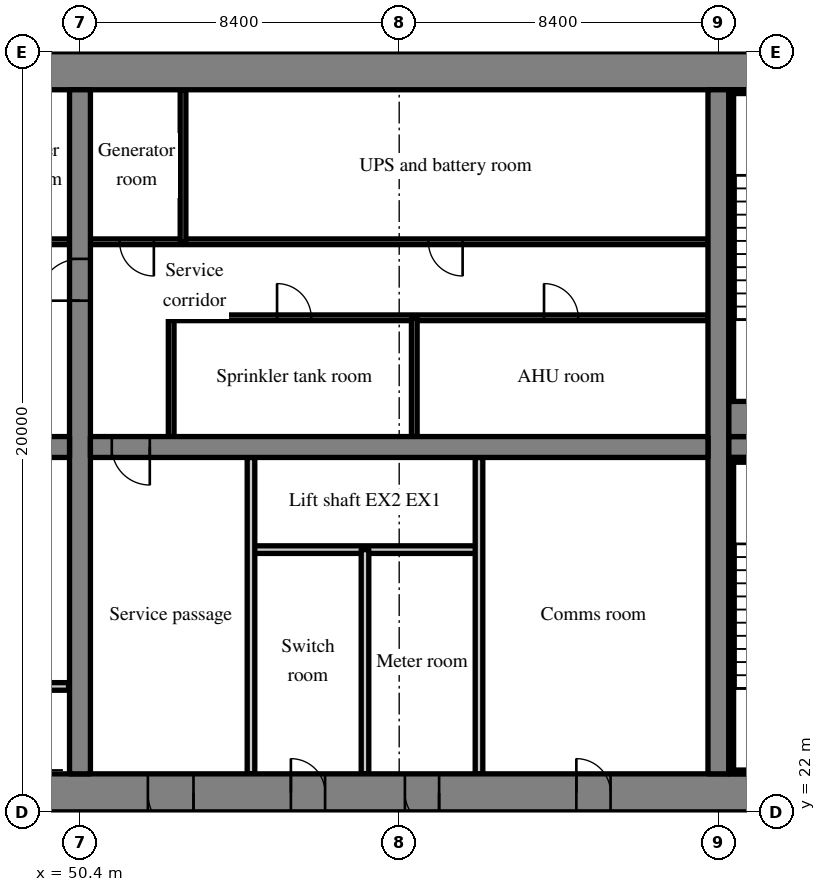
"""IFC4 building model, lengths in metres.
Left out: names, types, materials, properties, quantities, classifications, styles, units other than length and angle.
Written with IfcOpenShell. Run it as: python <this file> out.ifc"""

import sys

from ifc_helpers import new_model, si_unit, direction, frame, frame_2d, origin, place, context, subcontext, project, spatial, rectangle, extrude, source, transform, mapped, element, fill, save


model = new_model("IFC4")
c1 = context("Model", 3, precision=1e-05, world=origin(), true_north=direction((0.0, 1.0)))
c2 = subcontext(c1, "Body", "Model", "MODEL_VIEW")
j1 = project(units=[si_unit("LENGTHUNIT", "METRE"), si_unit("PLANEANGLEUNIT", "RADIAN")], contexts=[c1])
p1 = place(None, origin())
s1 = spatial("IfcSite", under=j1, at=p1, CompositionType="ELEMENT")
p2 = place(p1, origin())
s2 = spatial("IfcBuilding", under=s1, at=p2, CompositionType="ELEMENT")
p3 = place(p2, frame((0.0, 0.0, 81.0)))
s3 = spatial("IfcBuildingStorey", under=s2, at=p3, CompositionType="ELEMENT", Elevation=81.0)
m1 = source(origin(), c2, "Body", "SweptSolid", [
    extrude(rectangle(XDim=50.4, YDim=1.0, at=frame_2d((25.2, 0.0))), origin(), (0.0, 0.0, 1.0), 5.12),
])
p4 = place(p3, frame((25.2, 22.5, 0.0), z_axis=(0.0, 0.0, 1.0), x_axis=(1.0, 0.0, 0.0)))
e1 = element("IfcWall", 1, at=p4, inside=s3, PredefinedType="SHEAR", context=c2, shape_type="MappedRepresentation", body=[
    mapped(m1, transform((0.0, 0.0, 0.0), scale=1.0)),
])
m2 = source(origin(), c2, "Body", "SweptSolid", [
    extrude(rectangle(XDim=1.8, YDim=2.1, at=frame_2d((0.9, 1.05))), frame((0.0, 0.51, 0.0), z_axis=(0.0, -1.0, 0.0), x_axis=(1.0, 0.0, 0.0)), (0.0, 0.0, 1.0), 1.02),
])
p5 = place(p4, frame((15.9, 0.0, 0.0)))
e2 = element("IfcOpeningElement", 2, at=p5, cuts=e1, PredefinedType="OPENING", context=c2, shape_type="MappedRepresentation", body=[
    mapped(m2, transform((0.0, 0.0, 0.0), scale=1.0)),
])
m3 = source(origin(), c2, "Body", "SweptSolid", [
    extrude(rectangle(XDim=1.2, YDim=2.1, at=frame_2d((0.6, 1.05))), frame((0.0, 0.51, 0.0), z_axis=(0.0, -1.0, 0.0), x_axis=(1.0, 0.0, 0.0)), (0.0, 0.0, 1.0), 1.02),
])
p6 = place(p4, frame((26.987, 0.0, 0.0)))
e3 = element("IfcOpeningElement", 3, at=p6, cuts=e1, PredefinedType="OPENING", context=c2, shape_type="MappedRepresentation", body=[
    mapped(m3, transform((0.0, 0.0, 0.0), scale=1.0)),
])
m4 = source(origin(), c2, "Body", "SweptSolid", [
    extrude(rectangle(XDim=0.9, YDim=2.1, at=frame_2d((0.45, 1.05))), frame((0.0, 0.51, 0.0), z_axis=(0.0, -1.0, 0.0), x_axis=(1.0, 0.0, 0.0)), (0.0, 0.0, 1.0), 1.02),
])
p7 = place(p4, frame((33.75, 0.0, 0.0)))
e4 = element("IfcOpeningElement", 4, at=p7, cuts=e1, PredefinedType="OPENING", context=c2, shape_type="MappedRepresentation", body=[
    mapped(m4, transform((0.0, 0.0, 0.0), scale=1.0)),
])
p8 = place(p4, frame((30.75, 0.0, 0.0)))
e5 = element("IfcOpeningElement", 5, at=p8, cuts=e1, PredefinedType="OPENING", context=c2, shape_type="MappedRepresentation", body=[
    mapped(m4, transform((0.0, 0.0, 0.0), scale=1.0)),
])
p9 = place(p4, frame((38.262, 0.0, 0.0)))
e6 = element("IfcOpeningElement", 6, at=p9, cuts=e1, PredefinedType="OPENING", context=c2, shape_type="MappedRepresentation", body=[
    mapped(m4, transform((0.0, 0.0, 0.0), scale=1.0)),
])
p10 = place(p4, frame((6.438, 0.0, 0.0)))
e7 = element("IfcOpeningElement", 7, at=p10, cuts=e1, PredefinedType="OPENING", context=c2, shape_type="MappedRepresentation", body=[
    mapped(m3, transform((0.0, 0.0, 0.0), scale=1.0)),
])
p11 = place(p4, frame((47.725, 0.0, 0.0)))
e8 = element("IfcOpeningElement", 8, at=p11, cuts=e1, PredefinedType="OPENING", context=c2, shape_type="MappedRepresentation", body=[
    mapped(m3, transform((0.0, 0.0, 0.0), scale=1.0)),
])
p12 = place(p3, frame((25.2, 41.5, 0.0), z_axis=(0.0, 0.0, 1.0), x_axis=(1.0, 0.0, 0.0)))
e9 = element("IfcWall", 9, at=p12, inside=s3, PredefinedType="SHEAR", context=c2, shape_type="MappedRepresentation", body=[
    mapped(m1, transform((0.0, 0.0, 0.0), scale=1.0)),
])
m5 = source(origin(), c2, "Body", "SweptSolid", [
    extrude(rectangle(XDim=18.0, YDim=0.55, at=frame_2d((9.0, 0.0))), origin(), (0.0, 0.0, 1.0), 5.12),
])
p13 = place(p3, frame((50.4, 23.0, 0.0), z_axis=(0.0, 0.0, 1.0), x_axis=(0.0, 1.0, 0.0)))
e10 = element("IfcWall", 10, at=p13, inside=s3, PredefinedType="SHEAR", context=c2, shape_type="MappedRepresentation", body=[
    mapped(m5, transform((0.0, 0.0, 0.0), scale=1.0)),
])
m6 = source(origin(), c2, "Body", "SweptSolid", [
    extrude(rectangle(XDim=1.1, YDim=2.1, at=frame_2d((0.55, 1.05))), frame((0.0, 0.285, 0.0), z_axis=(0.0, -1.0, 0.0), x_axis=(1.0, 0.0, 0.0)), (0.0, 0.0, 1.0), 0.57),
])
p14 = place(p13, frame((12.45, 0.0, 0.0)))
e11 = element("IfcOpeningElement", 11, at=p14, cuts=e10, PredefinedType="OPENING", context=c2, shape_type="MappedRepresentation", body=[
    mapped(m6, transform((0.0, 0.0, 0.0), scale=1.0)),
])
p15 = place(p3, frame((67.2, 23.0, 0.0), z_axis=(0.0, 0.0, 1.0), x_axis=(0.0, 1.0, 0.0)))
e12 = element("IfcWall", 12, at=p15, inside=s3, PredefinedType="SHEAR", context=c2, shape_type="MappedRepresentation", body=[
    mapped(m5, transform((0.0, 0.0, 0.0), scale=1.0)),
])
m7 = source(origin(), c2, "Body", "SweptSolid", [
    extrude(rectangle(XDim=16.25, YDim=0.55, at=frame_2d((8.125, 0.0))), origin(), (0.0, 0.0, 1.0), 5.12),
])
p16 = place(p3, frame((33.875, 31.6, 0.0), z_axis=(0.0, 0.0, 1.0), x_axis=(1.0, 0.0, 0.0)))
e13 = element("IfcWall", 13, at=p16, inside=s3, PredefinedType="SHEAR", context=c2, shape_type="MappedRepresentation", body=[
    mapped(m7, transform((0.0, 0.0, 0.0), scale=1.0)),
])
m8 = source(origin(), c2, "Body", "SweptSolid", [
    extrude(rectangle(XDim=1.0, YDim=2.1, at=frame_2d((0.5, 1.05))), frame((0.0, 0.285, 0.0), z_axis=(0.0, -1.0, 0.0), x_axis=(1.0, 0.0, 0.0)), (0.0, 0.0, 1.0), 0.57),
])
p17 = place(p16, frame((14.687, 0.0, 0.0)))
e14 = element("IfcOpeningElement", 14, at=p17, cuts=e13, PredefinedType="OPENING", context=c2, shape_type="MappedRepresentation", body=[
    mapped(m8, transform((0.0, 0.0, 0.0), scale=1.0)),
])
p18 = place(p3, frame((50.675, 31.6, 0.0), z_axis=(0.0, 0.0, 1.0), x_axis=(1.0, 0.0, 0.0)))
e15 = element("IfcWall", 15, at=p18, inside=s3, PredefinedType="SHEAR", context=c2, shape_type="MappedRepresentation", body=[
    mapped(m7, transform((0.0, 0.0, 0.0), scale=1.0)),
])
p19 = place(p18, frame((0.562, 0.0, 0.0)))
e16 = element("IfcOpeningElement", 16, at=p19, cuts=e15, PredefinedType="OPENING", context=c2, shape_type="MappedRepresentation", body=[
    mapped(m8, transform((0.0, 0.0, 0.0), scale=1.0)),
])
m9 = source(origin(), c2, "Body", "SweptSolid", [
    extrude(rectangle(XDim=7.125, YDim=0.55, at=frame_2d((3.562, 0.0))), origin(), (0.0, 0.0, 1.0), 5.12),
])
p20 = place(p3, frame((67.475, 31.6, 0.0), z_axis=(0.0, 0.0, 1.0), x_axis=(1.0, 0.0, 0.0)))
e17 = element("IfcWall", 17, at=p20, inside=s3, PredefinedType="SHEAR", context=c2, shape_type="MappedRepresentation", body=[
    mapped(m9, transform((0.0, 0.0, 0.0), scale=1.0)),
])
p21 = place(p20, frame((5.5, 0.0, 0.0)))
e18 = element("IfcOpeningElement", 18, at=p21, cuts=e17, PredefinedType="OPENING", context=c2, shape_type="MappedRepresentation", body=[
    mapped(m6, transform((0.0, 0.0, 0.0), scale=1.0)),
])
m10 = source(origin(), c2, "Body", "SweptSolid", [
    extrude(rectangle(XDim=6.0, YDim=0.2, at=frame_2d((3.0, 0.0))), origin(), (0.0, 0.0, 1.0), 5.12),
])
p22 = place(p3, frame((44.1, 25.3, 0.0), z_axis=(0.0, 0.0, 1.0), x_axis=(1.0, 0.0, 0.0)))
e19 = element("IfcWall", 19, at=p22, inside=s3, PredefinedType="SOLIDWALL", context=c2, shape_type="MappedRepresentation", body=[
    mapped(m10, transform((0.0, 0.0, 0.0), scale=1.0)),
])
m11 = source(origin(), c2, "Body", "SweptSolid", [
    extrude(rectangle(XDim=16.25, YDim=0.15, at=frame_2d((8.125, 0.0))), origin(), (0.0, 0.0, 1.0), 5.12),
])
p23 = place(p3, frame((33.875, 37.0, 0.0), z_axis=(0.0, 0.0, 1.0), x_axis=(1.0, 0.0, 0.0)))
e20 = element("IfcWall", 20, at=p23, inside=s3, PredefinedType="PARTITIONING", context=c2, shape_type="MappedRepresentation", body=[
    mapped(m11, transform((0.0, 0.0, 0.0), scale=1.0)),
])
m12 = source(origin(), c2, "Body", "SweptSolid", [
    extrude(rectangle(XDim=0.9, YDim=2.1, at=frame_2d((0.45, 1.05))), frame((0.0, 0.085, 0.0), z_axis=(0.0, -1.0, 0.0), x_axis=(1.0, 0.0, 0.0)), (0.0, 0.0, 1.0), 0.17),
])
p24 = place(p23, frame((0.769, 0.0, 0.0)))
e21 = element("IfcOpeningElement", 21, at=p24, cuts=e20, PredefinedType="OPENING", context=c2, shape_type="MappedRepresentation", body=[
    mapped(m12, transform((0.0, 0.0, 0.0), scale=1.0)),
])
p25 = place(p23, frame((3.613, 0.0, 0.0)))
e22 = element("IfcOpeningElement", 22, at=p25, cuts=e20, PredefinedType="OPENING", context=c2, shape_type="MappedRepresentation", body=[
    mapped(m12, transform((0.0, 0.0, 0.0), scale=1.0)),
])
p26 = place(p23, frame((9.3, 0.0, 0.0)))
e23 = element("IfcOpeningElement", 23, at=p26, cuts=e20, PredefinedType="OPENING", context=c2, shape_type="MappedRepresentation", body=[
    mapped(m12, transform((0.0, 0.0, 0.0), scale=1.0)),
])
p27 = place(p23, frame((14.581, 0.0, 0.0)))
e24 = element("IfcOpeningElement", 24, at=p27, cuts=e20, PredefinedType="OPENING", context=c2, shape_type="MappedRepresentation", body=[
    mapped(m12, transform((0.0, 0.0, 0.0), scale=1.0)),
])
p28 = place(p3, frame((60.9, 28.9, 0.0), z_axis=(0.0, 0.0, 1.0), x_axis=(-1.0, 0.0, 0.0)))
e25 = element("IfcWall", 25, at=p28, inside=s3, PredefinedType="SOLIDWALL", context=c2, shape_type="MappedRepresentation", body=[
    mapped(m10, transform((0.0, 0.0, 0.0), scale=1.0)),
])
m13 = source(origin(), c2, "Body", "SweptSolid", [
    extrude(rectangle(XDim=8.325, YDim=0.2, at=frame_2d((4.163, 0.0))), origin(), (0.0, 0.0, 1.0), 5.12),
])
for number, where, z_axis, x_axis in (
    (26, (54.9, 23.0, 0.0), (0.0, 0.0, 1.0), (0.0, 1.0, 0.0)),
    (27, (60.9, 23.0, 0.0), (0.0, 0.0, 1.0), (0.0, 1.0, 0.0)),
):
    element("IfcWall", number, at=place(p3, frame(where, z_axis=z_axis, x_axis=x_axis)), inside=s3, PredefinedType="PARTITIONING", context=c2, shape_type="MappedRepresentation", body=[
        mapped(m13, transform((0.0, 0.0, 0.0), scale=1.0)),
    ])
m14 = source(origin(), c2, "Body", "SweptSolid", [
    extrude(rectangle(XDim=5.9, YDim=0.2, at=frame_2d((2.95, 0.0))), origin(), (0.0, 0.0, 1.0), 5.12),
])
p29 = place(p3, frame((57.9, 23.0, 0.0), z_axis=(0.0, 0.0, 1.0), x_axis=(0.0, 1.0, 0.0)))
e28 = element("IfcWall", 28, at=p29, inside=s3, PredefinedType="PARTITIONING", context=c2, shape_type="MappedRepresentation", body=[
    mapped(m14, transform((0.0, 0.0, 0.0), scale=1.0)),
])
m15 = source(origin(), c2, "Body", "SweptSolid", [
    extrude(rectangle(XDim=3.125, YDim=0.15, at=frame_2d((1.562, 0.0))), origin(), (0.0, 0.0, 1.0), 5.12),
])
p30 = place(p3, frame((52.8, 31.875, 0.0), z_axis=(0.0, 0.0, 1.0), x_axis=(0.0, 1.0, 0.0)))
e29 = element("IfcWall", 29, at=p30, inside=s3, PredefinedType="PARTITIONING", context=c2, shape_type="MappedRepresentation", body=[
    mapped(m15, transform((0.0, 0.0, 0.0), scale=1.0)),
])
m16 = source(origin(), c2, "Body", "SweptSolid", [
    extrude(rectangle(XDim=14.125, YDim=0.15, at=frame_2d((7.062, 0.0))), origin(), (0.0, 0.0, 1.0), 5.12),
])
p31 = place(p3, frame((66.925, 35.0, 0.0), z_axis=(0.0, 0.0, 1.0), x_axis=(-1.0, 0.0, 0.0)))
e30 = element("IfcWall", 30, at=p31, inside=s3, PredefinedType="PARTITIONING", context=c2, shape_type="MappedRepresentation", body=[
    mapped(m16, transform((0.0, 0.0, 0.0), scale=1.0)),
])
p32 = place(p31, frame((3.414, 0.0, 0.0)))
e31 = element("IfcOpeningElement", 31, at=p32, cuts=e30, PredefinedType="OPENING", context=c2, shape_type="MappedRepresentation", body=[
    mapped(m12, transform((0.0, 0.0, 0.0), scale=1.0)),
])
p33 = place(p31, frame((10.439, 0.0, 0.0)))
e32 = element("IfcOpeningElement", 32, at=p33, cuts=e30, PredefinedType="OPENING", context=c2, shape_type="MappedRepresentation", body=[
    mapped(m12, transform((0.0, 0.0, 0.0), scale=1.0)),
])
p34 = place(p3, frame((66.925, 37.0, 0.0), z_axis=(0.0, 0.0, 1.0), x_axis=(-1.0, 0.0, 0.0)))
e33 = element("IfcWall", 33, at=p34, inside=s3, PredefinedType="PARTITIONING", context=c2, shape_type="MappedRepresentation", body=[
    mapped(m11, transform((0.0, 0.0, 0.0), scale=1.0)),
])
p35 = place(p34, frame((6.456, 0.0, 0.0)))
e34 = element("IfcOpeningElement", 34, at=p35, cuts=e33, PredefinedType="OPENING", context=c2, shape_type="MappedRepresentation", body=[
    mapped(m12, transform((0.0, 0.0, 0.0), scale=1.0)),
])
p36 = place(p34, frame((14.581, 0.0, 0.0)))
e35 = element("IfcOpeningElement", 35, at=p36, cuts=e33, PredefinedType="OPENING", context=c2, shape_type="MappedRepresentation", body=[
    mapped(m12, transform((0.0, 0.0, 0.0), scale=1.0)),
])
p37 = place(p3, frame((59.197, 31.875, 0.0), z_axis=(0.0, 0.0, 1.0), x_axis=(0.0, 1.0, 0.0)))
e36 = element("IfcWall", 36, at=p37, inside=s3, PredefinedType="PARTITIONING", context=c2, shape_type="MappedRepresentation", body=[
    mapped(m15, transform((0.0, 0.0, 0.0), scale=1.0)),
])
m17 = source(origin(), c2, "Body", "SweptSolid", [
    extrude(rectangle(XDim=4.0, YDim=0.15, at=frame_2d((2.0, 0.0))), origin(), (0.0, 0.0, 1.0), 5.12),
])
p38 = place(p3, frame((53.112, 37.0, 0.0), z_axis=(0.0, 0.0, 1.0), x_axis=(0.0, 1.0, 0.0)))
e37 = element("IfcWall", 37, at=p38, inside=s3, PredefinedType="PARTITIONING", context=c2, shape_type="MappedRepresentation", body=[
    mapped(m17, transform((0.0, 0.0, 0.0), scale=1.0)),
])
m18 = source(origin(), c2, "Body", "SweptSolid", [
    extrude(rectangle(XDim=4.775, YDim=0.1, at=frame_2d((2.387, 0.0))), origin(), (0.0, 0.0, 1.0), 5.12),
])
p39 = place(p3, frame((67.475, 23.05, 0.0), z_axis=(0.0, 0.0, 1.0), x_axis=(1.0, 0.0, 0.0)))
e38 = element("IfcWall", 38, at=p39, inside=s3, PredefinedType="SOLIDWALL", context=c2, shape_type="MappedRepresentation", body=[
    mapped(m18, transform((0.0, 0.0, 0.0), scale=1.0)),
])
m19 = source(origin(), c2, "Body", "SweptSolid", [
    extrude(rectangle(XDim=4.775, YDim=0.125, at=frame_2d((2.387, 0.0))), origin(), (0.0, 0.0, 1.0), 5.12),
])
p40 = place(p3, frame((67.475, 31.262, 0.0), z_axis=(0.0, 0.0, 1.0), x_axis=(1.0, 0.0, 0.0)))
e39 = element("IfcWall", 39, at=p40, inside=s3, PredefinedType="SOLIDWALL", context=c2, shape_type="MappedRepresentation", body=[
    mapped(m19, transform((0.0, 0.0, 0.0), scale=1.0)),
])
m20 = source(origin(), c2, "Body", "SweptSolid", [
    extrude(rectangle(XDim=8.1, YDim=0.125, at=frame_2d((4.05, 0.0))), origin(), (0.0, 0.0, 1.0), 5.12),
])
p41 = place(p3, frame((67.537, 23.1, 0.0), z_axis=(0.0, 0.0, 1.0), x_axis=(0.0, 1.0, 0.0)))
e40 = element("IfcWall", 40, at=p41, inside=s3, PredefinedType="SOLIDWALL", context=c2, shape_type="MappedRepresentation", body=[
    mapped(m20, transform((0.0, 0.0, 0.0), scale=1.0)),
])
p42 = place(p3, frame((67.475, 40.95, 0.0), z_axis=(0.0, 0.0, 1.0), x_axis=(1.0, 0.0, 0.0)))
e41 = element("IfcWall", 41, at=p42, inside=s3, PredefinedType="SOLIDWALL", context=c2, shape_type="MappedRepresentation", body=[
    mapped(m18, transform((0.0, 0.0, 0.0), scale=1.0)),
])
m21 = source(origin(), c2, "Body", "SweptSolid", [
    extrude(rectangle(XDim=4.775, YDim=0.925, at=frame_2d((2.387, 0.0))), origin(), (0.0, 0.0, 1.0), 5.12),
])
p43 = place(p3, frame((67.475, 32.337, 0.0), z_axis=(0.0, 0.0, 1.0), x_axis=(1.0, 0.0, 0.0)))
e42 = element("IfcWall", 42, at=p43, inside=s3, PredefinedType="SOLIDWALL", context=c2, shape_type="MappedRepresentation", body=[
    mapped(m21, transform((0.0, 0.0, 0.0), scale=1.0)),
])
p44 = place(p3, frame((67.537, 32.8, 0.0), z_axis=(0.0, 0.0, 1.0), x_axis=(0.0, 1.0, 0.0)))
e43 = element("IfcWall", 43, at=p44, inside=s3, PredefinedType="SOLIDWALL", context=c2, shape_type="MappedRepresentation", body=[
    mapped(m20, transform((0.0, 0.0, 0.0), scale=1.0)),
])
m22 = source(origin(), c2, "Body", "SweptSolid", [
    extrude(rectangle(XDim=1.2, YDim=2.1, at=frame_2d((0.6, 1.05))), frame((0.0, 0.375, 0.0), z_axis=(0.0, -1.0, 0.0), x_axis=(1.0, 0.0, 0.0)), (0.0, 0.0, 1.0), 0.05),
])
p45 = place(p6, origin())
e44 = element("IfcDoor", 44, at=p45, inside=s3, OperationType="SINGLE_SWING_RIGHT", PredefinedType="DOOR", context=c2, shape_type="MappedRepresentation", body=[
    mapped(m22, transform((0.0, 0.0, 0.0), scale=1.0)),
])
fill(e3, e44)
m23 = source(origin(), c2, "Body", "SweptSolid", [
    extrude(rectangle(XDim=1.0, YDim=2.1, at=frame_2d((0.5, 1.05))), frame((0.0, 0.025, 0.0), z_axis=(0.0, -1.0, 0.0), x_axis=(1.0, 0.0, 0.0)), (0.0, 0.0, 1.0), 0.05),
])
p46 = place(p19, origin())
e45 = element("IfcDoor", 45, at=p46, inside=s3, OperationType="SINGLE_SWING_RIGHT", PredefinedType="DOOR", context=c2, shape_type="MappedRepresentation", body=[
    mapped(m23, transform((0.0, 0.0, 0.0), scale=1.0)),
])
fill(e16, e45)
m24 = source(origin(), c2, "Body", "SweptSolid", [
    extrude(rectangle(XDim=0.9, YDim=2.1, at=frame_2d((0.45, 1.05))), frame((0.0, 0.375, 0.0), z_axis=(0.0, -1.0, 0.0), x_axis=(1.0, 0.0, 0.0)), (0.0, 0.0, 1.0), 0.05),
])
p47 = place(p7, origin())
e46 = element("IfcDoor", 46, at=p47, inside=s3, OperationType="SINGLE_SWING_RIGHT", PredefinedType="DOOR", context=c2, shape_type="MappedRepresentation", body=[
    mapped(m24, transform((0.0, 0.0, 0.0), scale=1.0)),
])
fill(e4, e46)
p48 = place(p8, origin())
e47 = element("IfcDoor", 47, at=p48, inside=s3, OperationType="SINGLE_SWING_LEFT", PredefinedType="DOOR", context=c2, shape_type="MappedRepresentation", body=[
    mapped(m24, transform((0.0, 0.0, 0.0), scale=1.0)),
])
fill(e5, e47)
p49 = place(p9, origin())
e48 = element("IfcDoor", 48, at=p49, inside=s3, OperationType="SINGLE_SWING_LEFT", PredefinedType="DOOR", context=c2, shape_type="MappedRepresentation", body=[
    mapped(m24, transform((0.0, 0.0, 0.0), scale=1.0)),
])
fill(e6, e48)
m25 = source(origin(), c2, "Body", "SweptSolid", [
    extrude(rectangle(XDim=0.9, YDim=2.1, at=frame_2d((0.45, 1.05))), frame((0.0, 0.025, 0.0), z_axis=(0.0, -1.0, 0.0), x_axis=(1.0, 0.0, 0.0)), (0.0, 0.0, 1.0), 0.05),
])
p50 = place(p32, origin())
e49 = element("IfcDoor", 49, at=p50, inside=s3, OperationType="SINGLE_SWING_RIGHT", PredefinedType="DOOR", context=c2, shape_type="MappedRepresentation", body=[
    mapped(m25, transform((0.0, 0.0, 0.0), scale=1.0)),
])
fill(e31, e49)
p51 = place(p33, origin())
e50 = element("IfcDoor", 50, at=p51, inside=s3, OperationType="SINGLE_SWING_RIGHT", PredefinedType="DOOR", context=c2, shape_type="MappedRepresentation", body=[
    mapped(m25, transform((0.0, 0.0, 0.0), scale=1.0)),
])
fill(e32, e50)
p52 = place(p35, origin())
e51 = element("IfcDoor", 51, at=p52, inside=s3, OperationType="SINGLE_SWING_LEFT", PredefinedType="DOOR", context=c2, shape_type="MappedRepresentation", body=[
    mapped(m25, transform((0.0, 0.0, 0.0), scale=1.0)),
])
fill(e34, e51)
p53 = place(p36, origin())
e52 = element("IfcDoor", 52, at=p53, inside=s3, OperationType="SINGLE_SWING_LEFT", PredefinedType="DOOR", context=c2, shape_type="MappedRepresentation", body=[
    mapped(m25, transform((0.0, 0.0, 0.0), scale=1.0)),
])
fill(e35, e52)
m26 = source(origin(), c2, "Body", "SweptSolid", [
    extrude(rectangle(XDim=1.1, YDim=2.1, at=frame_2d((0.55, 1.05))), frame((0.0, 0.025, 0.0), z_axis=(0.0, -1.0, 0.0), x_axis=(1.0, 0.0, 0.0)), (0.0, 0.0, 1.0), 0.05),
])
p54 = place(p14, origin())
e53 = element("IfcDoor", 53, at=p54, inside=s3, OperationType="SINGLE_SWING_LEFT", PredefinedType="DOOR", context=c2, shape_type="MappedRepresentation", body=[
    mapped(m26, transform((0.0, 0.0, 0.0), scale=1.0)),
])
fill(e11, e53)
save(model, sys.argv[1])
